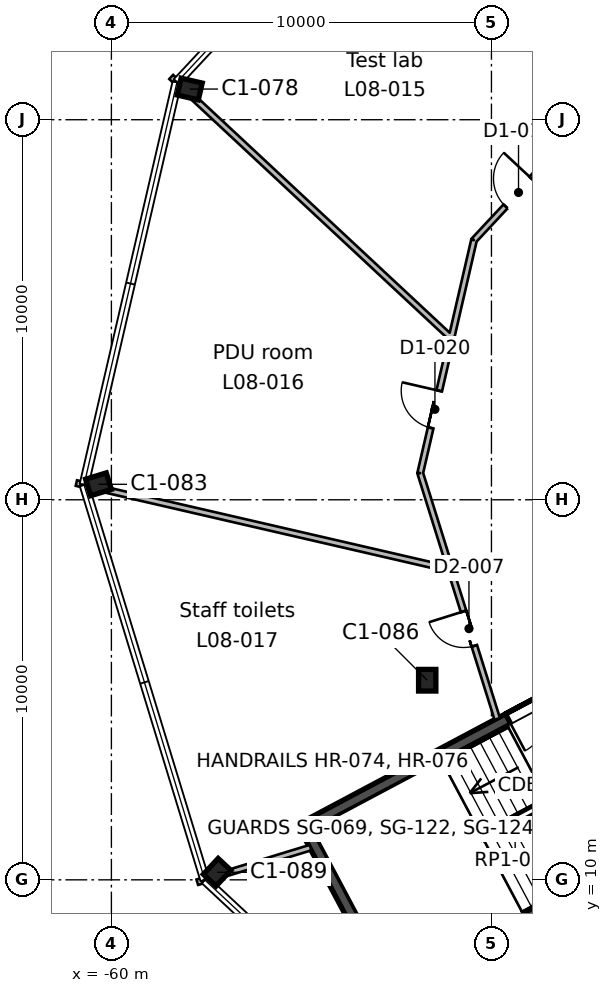
"""IFC4 building model, lengths in metres.
Left out: names, types, materials, properties, quantities, classifications, styles, units other than length and angle.
Written with IfcOpenShell. Run it as: python <this file> out.ifc"""

import sys

from ifc_helpers import new_model, si_unit, direction, frame, frame_2d, origin, origin_2d, place, context, subcontext, project, spatial, rectangle, i_section, extrude, element, fill, save


model = new_model("IFC4")
c1 = context("Model", 3, precision=1e-05, world=origin(), true_north=direction((0.0, 1.0)))
c2 = subcontext(c1, "Body", "Model", "MODEL_VIEW")
j1 = project(units=[si_unit("LENGTHUNIT", "METRE"), si_unit("PLANEANGLEUNIT", "RADIAN")], contexts=[c1])
p1 = place(None, origin())
s1 = spatial("IfcSite", under=j1, at=p1, CompositionType="ELEMENT")
p2 = place(p1, origin())
s2 = spatial("IfcBuilding", under=s1, at=p2, CompositionType="ELEMENT")
p3 = place(p2, frame((0.0, 0.0, 44.6)))
s3 = spatial("IfcBuildingStorey", under=s2, at=p3, CompositionType="ELEMENT", Elevation=44.6)
for number, where, z_axis, x_axis in (
    (1, (-57.219, 10.199, 0.0), (0.0, 0.0, 1.0), (0.731, -0.682, 0.0)),
    (2, (-51.69, 15.252, 0.0), (0.0, 0.0, 1.0), (1.0, 0.0, 0.0)),
    (3, (-60.34, 20.407, 0.0), (0.0, 0.0, 1.0), (0.292, -0.956, 0.0)),
    (4, (-57.939, 30.807, 0.0), (0.0, 0.0, 1.0), (-0.225, -0.974, 0.0)),
):
    element("IfcColumn", number, at=place(p3, frame(where, z_axis=z_axis, x_axis=x_axis)), inside=s3, PredefinedType="COLUMN", context=c2, shape_type="SweptSolid", body=[
        extrude(i_section(OverallWidth=0.455, OverallDepth=0.569, WebThickness=0.078, FlangeThickness=0.125, FilletRadius=0.015, at=origin_2d()), origin(), (0.0, 0.0, 1.0), 5.4),
    ])
p4 = place(p3, frame((-45.297, 11.007, 0.0), z_axis=(0.0, 0.0, 1.0), x_axis=(-0.882951519127, -0.469464178475, 0.0)))
e5 = element("IfcWall", 5, at=p4, inside=s3, PredefinedType="SHEAR", context=c2, shape_type="SweptSolid", body=[
    extrude(rectangle(XDim=8.3, YDim=0.3, at=frame_2d((4.15, 0.0))), origin(), (0.0, 0.0, 1.0), 5.4),
])
p5 = place(p3, frame((-52.626, 7.111, 0.0), z_axis=(0.0, 0.0, 1.0), x_axis=(-0.469464364128, 0.882951420416, 0.0)))
e6 = element("IfcWall", 6, at=p5, inside=s3, PredefinedType="SHEAR", context=c2, shape_type="SweptSolid", body=[
    extrude(rectangle(XDim=4.85, YDim=0.3, at=frame_2d((2.425, 0.0))), origin(), (0.0, 0.0, 1.0), 5.4),
])
p6 = place(p3, frame((-54.903, 11.393, 0.0), z_axis=(0.0, 0.0, 1.0), x_axis=(0.882939326045, 0.469487110071, 0.0)))
e7 = element("IfcWall", 7, at=p6, inside=s3, PredefinedType="SHEAR", context=c2, shape_type="SweptSolid", body=[
    extrude(rectangle(XDim=8.3, YDim=0.3, at=frame_2d((4.15, 0.0))), origin(), (0.0, 0.0, 1.0), 5.4),
])
p7 = place(p6, frame((6.05, 0.0, 0.0)))
e8 = element("IfcOpeningElement", 8, at=p7, cuts=e7, PredefinedType="OPENING", context=c2, shape_type="SweptSolid", body=[
    extrude(rectangle(XDim=1.9, YDim=2.1, at=frame_2d((0.95, 1.05))), frame((0.0, 0.16, 0.0), z_axis=(0.0, -1.0, 0.0), x_axis=(1.0, 0.0, 0.0)), (0.0, 0.0, 1.0), 0.32),
])
p8 = place(p3, frame((-51.08, 18.168, 0.0), z_axis=(0.0, 0.0, 1.0), x_axis=(-0.974375306075, 0.224928350615, 0.0)))
e9 = element("IfcWall", 9, at=p8, inside=s3, PredefinedType="PARTITIONING", context=c2, shape_type="SweptSolid", body=[
    extrude(rectangle(XDim=10.101, YDim=0.15, at=frame_2d((5.05, 0.0))), origin(), (0.0, 0.0, 1.0), 4.95),
])
p9 = place(p3, frame((-58.427, 31.125, 0.0), z_axis=(0.0, 0.0, 1.0), x_axis=(0.731473963822, -0.681869371838, 0.0)))
e10 = element("IfcWall", 10, at=p9, inside=s3, PredefinedType="PARTITIONING", context=c2, shape_type="SweptSolid", body=[
    extrude(rectangle(XDim=10.08, YDim=0.15, at=frame_2d((5.04, 0.0))), origin(), (0.0, 0.0, 1.0), 4.95),
])
p10 = place(p3, frame((-54.761, 10.848, 0.0), z_axis=(0.0, 0.0, 1.0), x_axis=(-0.956301064033, -0.29238378021, 0.0)))
e11 = element("IfcWall", 11, at=p10, inside=s3, PredefinedType="PARTITIONING", context=c2, shape_type="SweptSolid", body=[
    extrude(rectangle(XDim=3.115, YDim=0.15, at=frame_2d((1.558, 0.0))), origin(), (0.0, 0.0, 1.0), 4.95),
])
p11 = place(p3, frame((-51.041, 24.311, 0.0), z_axis=(0.0, 0.0, 1.0), x_axis=(-0.224893203367, -0.974383418927, 0.0)))
e12 = element("IfcWall", 12, at=p11, inside=s3, PredefinedType="PARTITIONING", context=c2, shape_type="SweptSolid", body=[
    extrude(rectangle(XDim=3.704, YDim=0.15, at=frame_2d((1.852, 0.0))), origin(), (0.0, 0.0, 1.0), 4.95),
])
p12 = place(p11, frame((1.482, 0.0, 0.0)))
e13 = element("IfcOpeningElement", 13, at=p12, cuts=e12, PredefinedType="OPENING", context=c2, shape_type="SweptSolid", body=[
    extrude(rectangle(XDim=1.0, YDim=2.1, at=frame_2d((0.5, 1.05))), frame((0.0, 0.085, 0.0), z_axis=(0.0, -1.0, 0.0), x_axis=(1.0, 0.0, 0.0)), (0.0, 0.0, 1.0), 0.17),
])
p13 = place(p3, frame((-51.874, 20.702, 0.0), z_axis=(0.0, 0.0, 1.0), x_axis=(0.299019355328, -0.954247046178, 0.0)))
e14 = element("IfcWall", 14, at=p13, inside=s3, PredefinedType="PARTITIONING", context=c2, shape_type="SweptSolid", body=[
    extrude(rectangle(XDim=2.595, YDim=0.15, at=frame_2d((1.298, 0.0))), origin(), (0.0, 0.0, 1.0), 4.95),
])
p14 = place(p3, frame((-49.847, 14.234, 0.0), z_axis=(0.0, 0.0, 1.0), x_axis=(-0.29896287329, 0.954264743346, 0.0)))
e15 = element("IfcWall", 15, at=p14, inside=s3, PredefinedType="PARTITIONING", context=c2, shape_type="SweptSolid", body=[
    extrude(rectangle(XDim=4.183, YDim=0.15, at=frame_2d((2.091, 0.0))), origin(), (0.0, 0.0, 1.0), 4.95),
])
p15 = place(p14, frame((2.015, 0.0, 0.0)))
e16 = element("IfcOpeningElement", 16, at=p15, cuts=e15, PredefinedType="OPENING", context=c2, shape_type="SweptSolid", body=[
    extrude(rectangle(XDim=0.95, YDim=2.1, at=frame_2d((0.475, 1.05))), frame((0.0, 0.085, 0.0), z_axis=(0.0, -1.0, 0.0), x_axis=(1.0, 0.0, 0.0)), (0.0, 0.0, 1.0), 0.17),
])
p16 = place(p3, frame((-47.933, 29.538, 0.0), z_axis=(0.0, 0.0, 1.0), x_axis=(-0.682088017664, -0.731270084277, 0.0)))
e17 = element("IfcWall", 17, at=p16, inside=s3, PredefinedType="PARTITIONING", context=c2, shape_type="SweptSolid", body=[
    extrude(rectangle(XDim=3.703, YDim=0.15, at=frame_2d((1.852, 0.0))), origin(), (0.0, 0.0, 1.0), 4.95),
])
p17 = place(p16, frame((1.486, 0.0, 0.0)))
e18 = element("IfcOpeningElement", 18, at=p17, cuts=e17, PredefinedType="OPENING", context=c2, shape_type="SweptSolid", body=[
    extrude(rectangle(XDim=1.0, YDim=2.1, at=frame_2d((0.5, 1.05))), frame((0.0, 0.085, 0.0), z_axis=(0.0, -1.0, 0.0), x_axis=(1.0, 0.0, 0.0)), (0.0, 0.0, 1.0), 0.17),
])
p18 = place(p3, frame((-50.459, 26.83, 0.0), z_axis=(0.0, 0.0, 1.0), x_axis=(-0.225121568864, -0.974330682691, 0.0)))
e19 = element("IfcWall", 19, at=p18, inside=s3, PredefinedType="PARTITIONING", context=c2, shape_type="SweptSolid", body=[
    extrude(rectangle(XDim=2.585, YDim=0.15, at=frame_2d((1.293, 0.0))), origin(), (0.0, 0.0, 1.0), 4.95),
])
p19 = place(p3, frame((-50.922, 39.133, 0.0), z_axis=(0.0, 0.0, 1.0), x_axis=(0.292463432429, -0.956276707178, 0.0)))
e20 = element("IfcWall", 20, at=p19, inside=s3, PredefinedType="PARTITIONING", context=c2, shape_type="SweptSolid", body=[
    extrude(rectangle(XDim=10.08, YDim=0.15, at=frame_2d((5.04, 0.0))), origin(), (0.0, 0.0, 1.0), 4.95),
])
p20 = place(p3, frame((-49.733, 2.433, 0.0), z_axis=(0.0, 0.0, 1.0), x_axis=(0.682002261255, 0.731350063679, 0.0)))
e21 = element("IfcWall", 21, at=p20, inside=s3, PredefinedType="PARTITIONING", context=c2, shape_type="SweptSolid", body=[
    extrude(rectangle(XDim=9.059, YDim=0.2, at=frame_2d((4.529, 0.0))), origin(), (0.0, 0.0, 1.0), 4.95),
])
p21 = place(p7, frame((1.9, 0.0, 0.0), z_axis=(0.0, 0.0, 1.0), x_axis=(-1.0, 0.0, 0.0)))
e22 = element("IfcDoor", 22, at=p21, inside=s3, OperationType="DOUBLE_DOOR_SINGLE_SWING", PredefinedType="DOOR", context=c2, shape_type="SweptSolid", body=[
    extrude(rectangle(XDim=1.9, YDim=2.1, at=frame_2d((0.95, 1.05))), frame((0.0, 0.025, 0.0), z_axis=(0.0, -1.0, 0.0), x_axis=(1.0, 0.0, 0.0)), (0.0, 0.0, 1.0), 0.05),
])
fill(e8, e22)
p22 = place(p17, frame((1.0, 0.0, 0.0), z_axis=(0.0, 0.0, 1.0), x_axis=(-1.0, 0.0, 0.0)))
e23 = element("IfcDoor", 23, at=p22, inside=s3, OperationType="SINGLE_SWING_RIGHT", PredefinedType="DOOR", context=c2, shape_type="SweptSolid", body=[
    extrude(rectangle(XDim=1.0, YDim=2.1, at=frame_2d((0.5, 1.05))), frame((0.0, 0.025, 0.0), z_axis=(0.0, -1.0, 0.0), x_axis=(1.0, 0.0, 0.0)), (0.0, 0.0, 1.0), 0.05),
])
fill(e18, e23)
p23 = place(p12, frame((1.0, 0.0, 0.0), z_axis=(0.0, 0.0, 1.0), x_axis=(-1.0, 0.0, 0.0)))
e24 = element("IfcDoor", 24, at=p23, inside=s3, OperationType="SINGLE_SWING_RIGHT", PredefinedType="DOOR", context=c2, shape_type="SweptSolid", body=[
    extrude(rectangle(XDim=1.0, YDim=2.1, at=frame_2d((0.5, 1.05))), frame((0.0, 0.025, 0.0), z_axis=(0.0, -1.0, 0.0), x_axis=(1.0, 0.0, 0.0)), (0.0, 0.0, 1.0), 0.05),
])
fill(e13, e24)
p24 = place(p15, origin())
e25 = element("IfcDoor", 25, at=p24, inside=s3, OperationType="SINGLE_SWING_RIGHT", PredefinedType="DOOR", context=c2, shape_type="SweptSolid", body=[
    extrude(rectangle(XDim=0.95, YDim=2.1, at=frame_2d((0.475, 1.05))), frame((0.0, 0.025, 0.0), z_axis=(0.0, -1.0, 0.0), x_axis=(1.0, 0.0, 0.0)), (0.0, 0.0, 1.0), 0.05),
])
fill(e16, e25)
save(model, sys.argv[1])
